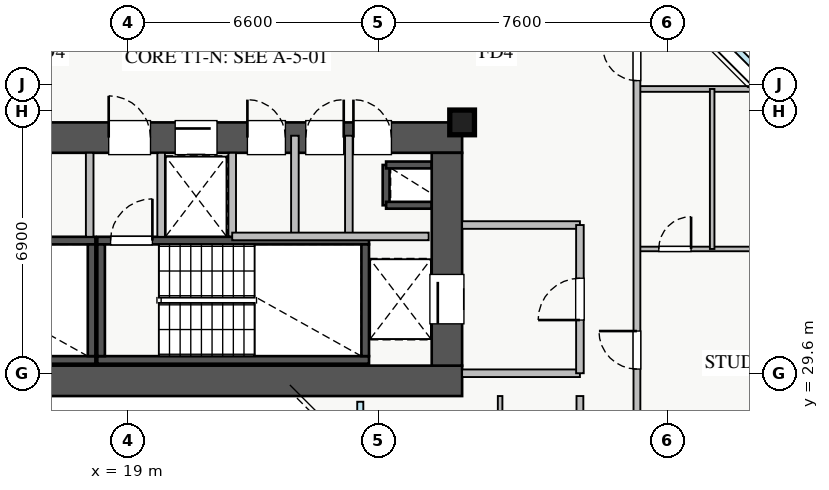
"""IFC4 building model, lengths in metres.
Left out: names, types, materials, properties, quantities, classifications, styles, units other than length and angle.
Written with IfcOpenShell. Run it as: python <this file> out.ifc"""

import sys

from ifc_helpers import new_model, si_unit, direction, frame, frame_2d, origin, origin_2d, place, context, subcontext, project, spatial, rectangle, extrude, source, transform, mapped, element, fill, save


model = new_model("IFC4")
c1 = context("Model", 3, precision=1e-05, world=origin(), true_north=direction((0.0, 1.0)))
c2 = subcontext(c1, "Body", "Model", "MODEL_VIEW")
j1 = project(units=[si_unit("LENGTHUNIT", "METRE"), si_unit("PLANEANGLEUNIT", "RADIAN")], contexts=[c1])
p1 = place(None, origin())
s1 = spatial("IfcSite", under=j1, at=p1, CompositionType="ELEMENT")
p2 = place(p1, origin())
s2 = spatial("IfcBuilding", under=s1, at=p2, CompositionType="ELEMENT")
p3 = place(p2, frame((0.0, 0.0, 53.5)))
s3 = spatial("IfcBuildingStorey", under=s2, at=p3, CompositionType="ELEMENT", Elevation=53.5)
p4 = place(p3, frame((25.8, 34.02, 0.0), z_axis=(0.0, 0.0, 1.0), x_axis=(0.0, 1.0, 0.0)))
e1 = element("IfcWall", 1, at=p4, inside=s3, PredefinedType="SHEAR", context=c2, shape_type="SweptSolid", body=[
    extrude(rectangle(XDim=1.06, YDim=0.18, at=frame_2d((0.53, 0.0))), origin(), (0.0, 0.0, 1.0), 3.07),
])
for number, where, z_axis, x_axis in (
    (2, (25.8, 35.08, 0.0), (0.0, 0.0, 1.0), (1.0, 0.0, 0.0)),
    (3, (25.8, 34.02, 0.0), (0.0, 0.0, 1.0), (1.0, 0.0, 0.0)),
):
    element("IfcWall", number, at=place(p3, frame(where, z_axis=z_axis, x_axis=x_axis)), inside=s3, PredefinedType="SHEAR", context=c2, shape_type="SweptSolid", body=[
        extrude(rectangle(XDim=1.2, YDim=0.18, at=frame_2d((0.6, 0.0))), origin(), (0.0, 0.0, 1.0), 3.07),
    ])
p5 = place(p3, frame((19.88, 33.2, 0.0), z_axis=(0.0, 0.0, 1.0), x_axis=(1.0, 0.0, 0.0)))
e4 = element("IfcWall", 4, at=p5, inside=s3, PredefinedType="SHEAR", context=c2, shape_type="SweptSolid", body=[
    extrude(rectangle(XDim=1.87, YDim=0.18, at=frame_2d((0.935, 0.0))), origin(), (0.0, 0.0, 1.0), 3.07),
])
p6 = place(p3, frame((11.0, 29.95, 0.0), z_axis=(0.0, 0.0, 1.0), x_axis=(1.0, 0.0, 0.0)))
e5 = element("IfcWall", 5, at=p6, inside=s3, PredefinedType="SHEAR", context=c2, shape_type="SweptSolid", body=[
    extrude(rectangle(XDim=7.15, YDim=0.2, at=frame_2d((3.575, 0.0))), origin(), (0.0, 0.0, 1.0), 3.25),
])
p7 = place(p3, frame((11.0, 33.09, 0.0), z_axis=(0.0, 0.0, 1.0), x_axis=(1.0, 0.0, 0.0)))
e6 = element("IfcWall", 6, at=p7, inside=s3, PredefinedType="SHEAR", context=c2, shape_type="SweptSolid", body=[
    extrude(rectangle(XDim=7.15, YDim=0.2, at=frame_2d((3.575, 0.0))), origin(), (0.0, 0.0, 1.0), 3.25),
])
p8 = place(p7, frame((0.35, 0.0, 0.0)))
e7 = element("IfcOpeningElement", 7, at=p8, cuts=e6, PredefinedType="OPENING", context=c2, shape_type="SweptSolid", body=[
    extrude(rectangle(XDim=1.1, YDim=2.05, at=frame_2d((0.55, 1.025))), frame((0.0, 0.11, 0.0), z_axis=(0.0, -1.0, 0.0), x_axis=(1.0, 0.0, 0.0)), (0.0, 0.0, 1.0), 0.22),
])
p9 = place(p3, frame((18.05, 30.05, 0.0), z_axis=(0.0, 0.0, 1.0), x_axis=(0.0, 1.0, 0.0)))
e8 = element("IfcWall", 8, at=p9, inside=s3, PredefinedType="SHEAR", context=c2, shape_type="SweptSolid", body=[
    extrude(rectangle(XDim=2.94, YDim=0.2, at=frame_2d((1.47, 0.0))), origin(), (0.0, 0.0, 1.0), 3.25),
])
p10 = place(p3, frame((18.2, 29.95, 0.0), z_axis=(0.0, 0.0, 1.0), x_axis=(1.0, 0.0, 0.0)))
e9 = element("IfcWall", 9, at=p10, inside=s3, PredefinedType="SHEAR", context=c2, shape_type="SweptSolid", body=[
    extrude(rectangle(XDim=7.15, YDim=0.2, at=frame_2d((3.575, 0.0))), origin(), (0.0, 0.0, 1.0), 3.25),
])
p11 = place(p3, frame((18.2, 33.09, 0.0), z_axis=(0.0, 0.0, 1.0), x_axis=(1.0, 0.0, 0.0)))
e10 = element("IfcWall", 10, at=p11, inside=s3, PredefinedType="SHEAR", context=c2, shape_type="SweptSolid", body=[
    extrude(rectangle(XDim=7.15, YDim=0.2, at=frame_2d((3.575, 0.0))), origin(), (0.0, 0.0, 1.0), 3.25),
])
p12 = place(p11, frame((0.35, 0.0, 0.0)))
e11 = element("IfcOpeningElement", 11, at=p12, cuts=e10, PredefinedType="OPENING", context=c2, shape_type="SweptSolid", body=[
    extrude(rectangle(XDim=1.1, YDim=2.05, at=frame_2d((0.55, 1.025))), frame((0.0, 0.11, 0.0), z_axis=(0.0, -1.0, 0.0), x_axis=(1.0, 0.0, 0.0)), (0.0, 0.0, 1.0), 0.22),
])
for number, where, z_axis, x_axis in (
    (12, (18.3, 30.05, 0.0), (0.0, 0.0, 1.0), (0.0, 1.0, 0.0)),
    (13, (25.25, 30.05, 0.0), (0.0, 0.0, 1.0), (0.0, 1.0, 0.0)),
):
    element("IfcWall", number, at=place(p3, frame(where, z_axis=z_axis, x_axis=x_axis)), inside=s3, PredefinedType="SHEAR", context=c2, shape_type="SweptSolid", body=[
        extrude(rectangle(XDim=2.94, YDim=0.2, at=frame_2d((1.47, 0.0))), origin(), (0.0, 0.0, 1.0), 3.25),
    ])
p13 = place(p3, frame((10.2, 29.4, 0.0), z_axis=(0.0, 0.0, 1.0), x_axis=(1.0, 0.0, 0.0)))
e14 = element("IfcWall", 14, at=p13, inside=s3, PredefinedType="SHEAR", context=c2, shape_type="SweptSolid", body=[
    extrude(rectangle(XDim=17.6, YDim=0.8, at=frame_2d((8.8, 0.0))), origin(), (0.0, 0.0, 1.0), 3.25),
])
p14 = place(p3, frame((10.2, 35.8, 0.0), z_axis=(0.0, 0.0, 1.0), x_axis=(1.0, 0.0, 0.0)))
e15 = element("IfcWall", 15, at=p14, inside=s3, PredefinedType="SHEAR", context=c2, shape_type="SweptSolid", body=[
    extrude(rectangle(XDim=17.6, YDim=0.8, at=frame_2d((8.8, 0.0))), origin(), (0.0, 0.0, 1.0), 3.25),
])
p15 = place(p14, frame((1.15, 0.0, 0.0)))
e16 = element("IfcOpeningElement", 16, at=p15, cuts=e15, PredefinedType="OPENING", context=c2, shape_type="SweptSolid", body=[
    extrude(rectangle(XDim=1.1, YDim=2.05, at=frame_2d((0.55, 1.025))), frame((0.0, 0.41, 0.0), z_axis=(0.0, -1.0, 0.0), x_axis=(1.0, 0.0, 0.0)), (0.0, 0.0, 1.0), 0.82),
])
p16 = place(p14, frame((8.3, 0.0, 0.0)))
e17 = element("IfcOpeningElement", 17, at=p16, cuts=e15, PredefinedType="OPENING", context=c2, shape_type="SweptSolid", body=[
    extrude(rectangle(XDim=1.1, YDim=2.05, at=frame_2d((0.55, 1.025))), frame((0.0, 0.41, 0.0), z_axis=(0.0, -1.0, 0.0), x_axis=(1.0, 0.0, 0.0)), (0.0, 0.0, 1.0), 0.82),
])
p17 = place(p14, frame((10.05, 0.0, 0.0)))
e18 = element("IfcOpeningElement", 18, at=p17, cuts=e15, PredefinedType="OPENING", context=c2, shape_type="SweptSolid", body=[
    extrude(rectangle(XDim=1.1, YDim=2.05, at=frame_2d((0.55, 1.025))), frame((0.0, 0.41, 0.0), z_axis=(0.0, -1.0, 0.0), x_axis=(1.0, 0.0, 0.0)), (0.0, 0.0, 1.0), 0.82),
])
p18 = place(p14, frame((14.74, 0.0, 0.0)))
e19 = element("IfcOpeningElement", 19, at=p18, cuts=e15, PredefinedType="OPENING", context=c2, shape_type="SweptSolid", body=[
    extrude(rectangle(XDim=1.0, YDim=2.05, at=frame_2d((0.5, 1.025))), frame((0.0, 0.41, 0.0), z_axis=(0.0, -1.0, 0.0), x_axis=(1.0, 0.0, 0.0)), (0.0, 0.0, 1.0), 0.82),
])
p19 = place(p14, frame((11.95, 0.0, 0.0)))
e20 = element("IfcOpeningElement", 20, at=p19, cuts=e15, PredefinedType="OPENING", context=c2, shape_type="SweptSolid", body=[
    extrude(rectangle(XDim=1.0, YDim=2.05, at=frame_2d((0.5, 1.025))), frame((0.0, 0.41, 0.0), z_axis=(0.0, -1.0, 0.0), x_axis=(1.0, 0.0, 0.0)), (0.0, 0.0, 1.0), 0.82),
])
p20 = place(p14, frame((13.485, 0.0, 0.0)))
e21 = element("IfcOpeningElement", 21, at=p20, cuts=e15, PredefinedType="OPENING", context=c2, shape_type="SweptSolid", body=[
    extrude(rectangle(XDim=1.0, YDim=2.05, at=frame_2d((0.5, 1.025))), frame((0.0, 0.41, 0.0), z_axis=(0.0, -1.0, 0.0), x_axis=(1.0, 0.0, 0.0)), (0.0, 0.0, 1.0), 0.82),
])
p21 = place(p3, frame((27.4, 29.8, 0.0), z_axis=(0.0, 0.0, 1.0), x_axis=(0.0, 1.0, 0.0)))
e22 = element("IfcWall", 22, at=p21, inside=s3, PredefinedType="SHEAR", context=c2, shape_type="SweptSolid", body=[
    extrude(rectangle(XDim=5.6, YDim=0.8, at=frame_2d((2.8, 0.0))), origin(), (0.0, 0.0, 1.0), 3.25),
])
p22 = place(p21, frame((1.1, 0.0, 0.0)))
e23 = element("IfcOpeningElement", 23, at=p22, cuts=e22, PredefinedType="OPENING", context=c2, shape_type="SweptSolid", body=[
    extrude(rectangle(XDim=1.3, YDim=2.05, at=frame_2d((0.65, 1.025))), frame((0.0, 0.41, 0.0), z_axis=(0.0, -1.0, 0.0), x_axis=(1.0, 0.0, 0.0)), (0.0, 0.0, 1.0), 0.82),
])
m1 = source(origin(), c2, "Body", "SweptSolid", [
    extrude(rectangle(XDim=0.65, YDim=0.65, at=origin_2d()), origin(), (0.0, 0.0, 1.0), 3.25),
])
p23 = place(p3, frame((27.8, 36.2, 0.0), z_axis=(0.0, 0.0, 1.0), x_axis=(1.0, 0.0, 0.0)))
e24 = element("IfcColumn", 24, at=p23, inside=s3, PredefinedType="PILASTER", context=c2, shape_type="MappedRepresentation", body=[
    mapped(m1, transform((0.0, 0.0, 0.0), x_axis=(1.0, 0.0, 0.0), y_axis=(0.0, 1.0, 0.0), z_axis=(0.0, 0.0, 1.0), scale=1.0)),
])
for number, where, z_axis, x_axis in (
    (25, (27.8, 29.6, 0.0), (0.0, 0.0, 1.0), (1.0, 0.0, 0.0)),
    (26, (27.8, 33.5, 0.0), (0.0, 0.0, 1.0), (1.0, 0.0, 0.0)),
):
    element("IfcWall", number, at=place(p3, frame(where, z_axis=z_axis, x_axis=x_axis)), inside=s3, PredefinedType="PARTITIONING", context=c2, shape_type="SweptSolid", body=[
        extrude(rectangle(XDim=3.1, YDim=0.2, at=frame_2d((1.55, 0.0))), origin(), (0.0, 0.0, 1.0), 3.07),
    ])
p24 = place(p3, frame((30.9, 29.6, 0.0), z_axis=(0.0, 0.0, 1.0), x_axis=(0.0, 1.0, 0.0)))
e27 = element("IfcWall", 27, at=p24, inside=s3, PredefinedType="PARTITIONING", context=c2, shape_type="SweptSolid", body=[
    extrude(rectangle(XDim=3.9, YDim=0.2, at=frame_2d((1.95, 0.0))), origin(), (0.0, 0.0, 1.0), 3.07),
])
p25 = place(p24, frame((1.4, 0.0, 0.0)))
e28 = element("IfcOpeningElement", 28, at=p25, cuts=e27, PredefinedType="OPENING", context=c2, shape_type="SweptSolid", body=[
    extrude(rectangle(XDim=1.1, YDim=2.05, at=frame_2d((0.55, 1.025))), frame((0.0, 0.11, 0.0), z_axis=(0.0, -1.0, 0.0), x_axis=(1.0, 0.0, 0.0)), (0.0, 0.0, 1.0), 0.22),
])
for number, where, z_axis, x_axis in (
    (29, (18.0, 33.19, 0.0), (0.0, 0.0, 1.0), (0.0, 1.0, 0.0)),
    (30, (19.88, 33.19, 0.0), (0.0, 0.0, 1.0), (0.0, 1.0, 0.0)),
):
    element("IfcWall", number, at=place(p3, frame(where, z_axis=z_axis, x_axis=x_axis)), inside=s3, PredefinedType="PARTITIONING", context=c2, shape_type="SweptSolid", body=[
        extrude(rectangle(XDim=2.21, YDim=0.2, at=frame_2d((1.105, 0.0))), origin(), (0.0, 0.0, 1.0), 3.07),
    ])
p26 = place(p3, frame((24.82, 33.2, 0.0), z_axis=(0.0, 0.0, 1.0), x_axis=(0.0, 1.0, 0.0)))
e31 = element("IfcWall", 31, at=p26, inside=s3, PredefinedType="PARTITIONING", context=c2, shape_type="SweptSolid", body=[
    extrude(rectangle(XDim=2.65, YDim=0.2, at=frame_2d((1.325, 0.0))), origin(), (0.0, 0.0, 1.0), 3.07),
])
p27 = place(p3, frame((21.75, 33.2, 0.0), z_axis=(0.0, 0.0, 1.0), x_axis=(0.0, 1.0, 0.0)))
e32 = element("IfcWall", 32, at=p27, inside=s3, PredefinedType="PARTITIONING", context=c2, shape_type="SweptSolid", body=[
    extrude(rectangle(XDim=2.2, YDim=0.2, at=frame_2d((1.1, 0.0))), origin(), (0.0, 0.0, 1.0), 3.07),
])
p28 = place(p3, frame((23.4, 33.2, 0.0), z_axis=(0.0, 0.0, 1.0), x_axis=(0.0, 1.0, 0.0)))
e33 = element("IfcWall", 33, at=p28, inside=s3, PredefinedType="PARTITIONING", context=c2, shape_type="SweptSolid", body=[
    extrude(rectangle(XDim=2.65, YDim=0.2, at=frame_2d((1.325, 0.0))), origin(), (0.0, 0.0, 1.0), 3.07),
])
p29 = place(p3, frame((21.75, 33.2, 0.0), z_axis=(0.0, 0.0, 1.0), x_axis=(1.0, 0.0, 0.0)))
e34 = element("IfcWall", 34, at=p29, inside=s3, PredefinedType="PARTITIONING", context=c2, shape_type="SweptSolid", body=[
    extrude(rectangle(XDim=5.17, YDim=0.2, at=frame_2d((2.585, 0.0))), origin(), (0.0, 0.0, 1.0), 3.07),
])
p30 = place(p3, frame((32.4, 37.08, 0.0), z_axis=(0.0, 0.0, 1.0), x_axis=(1.0, 0.0, 0.0)))
e35 = element("IfcWall", 35, at=p30, inside=s3, PredefinedType="PARTITIONING", context=c2, shape_type="SweptSolid", body=[
    extrude(rectangle(XDim=5.35, YDim=0.15, at=frame_2d((2.675, 0.0))), origin(), (0.0, 0.0, 1.0), 3.07),
])
p31 = place(p3, frame((32.4, 32.87, 0.0), z_axis=(0.0, 0.0, 1.0), x_axis=(1.0, 0.0, 0.0)))
e36 = element("IfcWall", 36, at=p31, inside=s3, PredefinedType="PLUMBINGWALL", context=c2, shape_type="SweptSolid", body=[
    extrude(rectangle(XDim=5.35, YDim=0.12, at=frame_2d((2.675, 0.0))), origin(), (0.0, 0.0, 1.0), 3.07),
])
p32 = place(p31, frame((0.575, 0.0, 0.0)))
e37 = element("IfcOpeningElement", 37, at=p32, cuts=e36, PredefinedType="OPENING", context=c2, shape_type="SweptSolid", body=[
    extrude(rectangle(XDim=0.85, YDim=2.05, at=frame_2d((0.425, 1.025))), frame((0.0, 0.07, 0.0), z_axis=(0.0, -1.0, 0.0), x_axis=(1.0, 0.0, 0.0)), (0.0, 0.0, 1.0), 0.14),
])
p33 = place(p31, frame((3.205, 0.0, 0.0)))
e38 = element("IfcOpeningElement", 38, at=p33, cuts=e36, PredefinedType="OPENING", context=c2, shape_type="SweptSolid", body=[
    extrude(rectangle(XDim=0.9, YDim=2.05, at=frame_2d((0.45, 1.025))), frame((0.0, 0.07, 0.0), z_axis=(0.0, -1.0, 0.0), x_axis=(1.0, 0.0, 0.0)), (0.0, 0.0, 1.0), 0.14),
])
p34 = place(p3, frame((34.38, 32.87, 0.0), z_axis=(0.0, 0.0, 1.0), x_axis=(0.0, 1.0, 0.0)))
e39 = element("IfcWall", 39, at=p34, inside=s3, PredefinedType="PLUMBINGWALL", context=c2, shape_type="SweptSolid", body=[
    extrude(rectangle(XDim=4.21, YDim=0.12, at=frame_2d((2.105, 0.0))), origin(), (0.0, 0.0, 1.0), 3.07),
])
p35 = place(p3, frame((32.4, 7.21, 0.0), z_axis=(0.0, 0.0, 1.0), x_axis=(0.0, 1.0, 0.0)))
e40 = element("IfcWall", 40, at=p35, inside=s3, PredefinedType="PARTITIONING", context=c2, shape_type="SweptSolid", body=[
    extrude(rectangle(XDim=31.23, YDim=0.18, at=frame_2d((15.615, 0.0))), origin(), (0.0, 0.0, 1.0), 2.771),
])
p36 = place(p35, frame((30.09, 0.0, 0.0)))
e41 = element("IfcOpeningElement", 41, at=p36, cuts=e40, PredefinedType="OPENING", context=c2, shape_type="SweptSolid", body=[
    extrude(rectangle(XDim=0.9, YDim=2.05, at=frame_2d((0.45, 1.025))), frame((0.0, 0.1, 0.0), z_axis=(0.0, -1.0, 0.0), x_axis=(1.0, 0.0, 0.0)), (0.0, 0.0, 1.0), 0.2),
])
p37 = place(p35, frame((0.415, 0.0, 0.0)))
e42 = element("IfcOpeningElement", 42, at=p37, cuts=e40, PredefinedType="OPENING", context=c2, shape_type="SweptSolid", body=[
    extrude(rectangle(XDim=0.9, YDim=2.05, at=frame_2d((0.45, 1.025))), frame((0.0, 0.1, 0.0), z_axis=(0.0, -1.0, 0.0), x_axis=(1.0, 0.0, 0.0)), (0.0, 0.0, 1.0), 0.2),
])
p38 = place(p35, frame((3.585, 0.0, 0.0)))
e43 = element("IfcOpeningElement", 43, at=p38, cuts=e40, PredefinedType="OPENING", context=c2, shape_type="SweptSolid", body=[
    extrude(rectangle(XDim=1.0, YDim=2.05, at=frame_2d((0.5, 1.025))), frame((0.0, 0.1, 0.0), z_axis=(0.0, -1.0, 0.0), x_axis=(1.0, 0.0, 0.0)), (0.0, 0.0, 1.0), 0.2),
])
p39 = place(p35, frame((12.86, 0.0, 0.0)))
e44 = element("IfcOpeningElement", 44, at=p39, cuts=e40, PredefinedType="OPENING", context=c2, shape_type="SweptSolid", body=[
    extrude(rectangle(XDim=1.0, YDim=2.05, at=frame_2d((0.5, 1.025))), frame((0.0, 0.1, 0.0), z_axis=(0.0, -1.0, 0.0), x_axis=(1.0, 0.0, 0.0)), (0.0, 0.0, 1.0), 0.2),
])
p40 = place(p35, frame((22.5, 0.0, 0.0)))
e45 = element("IfcOpeningElement", 45, at=p40, cuts=e40, PredefinedType="OPENING", context=c2, shape_type="SweptSolid", body=[
    extrude(rectangle(XDim=1.0, YDim=2.05, at=frame_2d((0.5, 1.025))), frame((0.0, 0.1, 0.0), z_axis=(0.0, -1.0, 0.0), x_axis=(1.0, 0.0, 0.0)), (0.0, 0.0, 1.0), 0.2),
])
p41 = place(p3, frame((28.8, 26.24, 0.0), z_axis=(0.0, 0.0, 1.0), x_axis=(0.0, 1.0, 0.0)))
e46 = element("IfcWall", 46, at=p41, inside=s3, PredefinedType="PLUMBINGWALL", context=c2, shape_type="SweptSolid", body=[
    extrude(rectangle(XDim=2.76, YDim=0.12, at=frame_2d((1.38, 0.0))), origin(), (0.0, 0.0, 1.0), 3.07),
])
p42 = place(p3, frame((30.9, 17.0, 0.0), z_axis=(0.0, 0.0, 1.0), x_axis=(0.0, 1.0, 0.0)))
e47 = element("IfcWall", 47, at=p42, inside=s3, PredefinedType="PARTITIONING", context=c2, shape_type="SweptSolid", body=[
    extrude(rectangle(XDim=12.0, YDim=0.18, at=frame_2d((6.0, 0.0))), origin(), (0.0, 0.0, 1.0), 3.07),
])
p43 = place(p42, frame((0.93, 0.0, 0.0)))
e48 = element("IfcOpeningElement", 48, at=p43, cuts=e47, PredefinedType="OPENING", context=c2, shape_type="SweptSolid", body=[
    extrude(rectangle(XDim=1.0, YDim=2.05, at=frame_2d((0.5, 1.025))), frame((0.0, 0.1, 0.0), z_axis=(0.0, -1.0, 0.0), x_axis=(1.0, 0.0, 0.0)), (0.0, 0.0, 1.0), 0.2),
])
p44 = place(p42, frame((6.93, 0.0, 0.0)))
e49 = element("IfcOpeningElement", 49, at=p44, cuts=e47, PredefinedType="OPENING", context=c2, shape_type="SweptSolid", body=[
    extrude(rectangle(XDim=1.0, YDim=2.05, at=frame_2d((0.5, 1.025))), frame((0.0, 0.1, 0.0), z_axis=(0.0, -1.0, 0.0), x_axis=(1.0, 0.0, 0.0)), (0.0, 0.0, 1.0), 0.2),
])
m2 = source(origin(), c2, "Body", "SweptSolid", [
    extrude(rectangle(XDim=1.3, YDim=2.05, at=frame_2d((0.65, 1.025))), frame((0.0, 0.025, 0.0), z_axis=(0.0, -1.0, 0.0), x_axis=(1.0, 0.0, 0.0)), (0.0, 0.0, 1.0), 0.05),
])
p45 = place(p22, origin())
e50 = element("IfcDoor", 50, at=p45, inside=s3, OperationType="SLIDING_TO_LEFT", PredefinedType="DOOR", context=c2, shape_type="MappedRepresentation", body=[
    mapped(m2, transform((0.0, 0.0, 0.0), x_axis=(1.0, 0.0, 0.0), y_axis=(0.0, 1.0, 0.0), z_axis=(0.0, 0.0, 1.0), scale=1.0)),
])
fill(e23, e50)
m3 = source(origin(), c2, "Body", "SweptSolid", [
    extrude(rectangle(XDim=1.1, YDim=2.05, at=frame_2d((0.55, 1.025))), frame((0.0, 0.025, 0.0), z_axis=(0.0, -1.0, 0.0), x_axis=(1.0, 0.0, 0.0)), (0.0, 0.0, 1.0), 0.05),
])
p46 = place(p16, origin())
e51 = element("IfcDoor", 51, at=p46, inside=s3, OperationType="SINGLE_SWING_LEFT", PredefinedType="DOOR", context=c2, shape_type="MappedRepresentation", body=[
    mapped(m3, transform((0.0, 0.0, 0.0), x_axis=(1.0, 0.0, 0.0), y_axis=(0.0, 1.0, 0.0), z_axis=(0.0, 0.0, 1.0), scale=1.0)),
])
fill(e17, e51)
p47 = place(p12, origin())
e52 = element("IfcDoor", 52, at=p47, inside=s3, OperationType="SINGLE_SWING_RIGHT", PredefinedType="DOOR", context=c2, shape_type="MappedRepresentation", body=[
    mapped(m3, transform((0.0, 0.0, 0.0), x_axis=(1.0, 0.0, 0.0), y_axis=(0.0, 1.0, 0.0), z_axis=(0.0, 0.0, 1.0), scale=1.0)),
])
fill(e11, e52)
p48 = place(p17, origin())
e53 = element("IfcDoor", 53, at=p48, inside=s3, OperationType="SLIDING_TO_LEFT", PredefinedType="DOOR", context=c2, shape_type="MappedRepresentation", body=[
    mapped(m3, transform((0.0, 0.0, 0.0), x_axis=(1.0, 0.0, 0.0), y_axis=(0.0, 1.0, 0.0), z_axis=(0.0, 0.0, 1.0), scale=1.0)),
])
fill(e18, e53)
m4 = source(origin(), c2, "Body", "SweptSolid", [
    extrude(rectangle(XDim=1.0, YDim=2.05, at=frame_2d((0.5, 1.025))), frame((0.0, 0.025, 0.0), z_axis=(0.0, -1.0, 0.0), x_axis=(1.0, 0.0, 0.0)), (0.0, 0.0, 1.0), 0.05),
])
p49 = place(p18, origin())
e54 = element("IfcDoor", 54, at=p49, inside=s3, OperationType="SINGLE_SWING_LEFT", PredefinedType="DOOR", context=c2, shape_type="MappedRepresentation", body=[
    mapped(m4, transform((0.0, 0.0, 0.0), x_axis=(1.0, 0.0, 0.0), y_axis=(0.0, 1.0, 0.0), z_axis=(0.0, 0.0, 1.0), scale=1.0)),
])
fill(e19, e54)
p50 = place(p19, origin())
e55 = element("IfcDoor", 55, at=p50, inside=s3, OperationType="SINGLE_SWING_LEFT", PredefinedType="DOOR", context=c2, shape_type="MappedRepresentation", body=[
    mapped(m4, transform((0.0, 0.0, 0.0), x_axis=(1.0, 0.0, 0.0), y_axis=(0.0, 1.0, 0.0), z_axis=(0.0, 0.0, 1.0), scale=1.0)),
])
fill(e20, e55)
p51 = place(p20, origin())
e56 = element("IfcDoor", 56, at=p51, inside=s3, OperationType="SINGLE_SWING_RIGHT", PredefinedType="DOOR", context=c2, shape_type="MappedRepresentation", body=[
    mapped(m4, transform((0.0, 0.0, 0.0), x_axis=(1.0, 0.0, 0.0), y_axis=(0.0, 1.0, 0.0), z_axis=(0.0, 0.0, 1.0), scale=1.0)),
])
fill(e21, e56)
p52 = place(p25, origin())
e57 = element("IfcDoor", 57, at=p52, inside=s3, OperationType="SINGLE_SWING_LEFT", PredefinedType="DOOR", context=c2, shape_type="MappedRepresentation", body=[
    mapped(m3, transform((0.0, 0.0, 0.0), x_axis=(1.0, 0.0, 0.0), y_axis=(0.0, 1.0, 0.0), z_axis=(0.0, 0.0, 1.0), scale=1.0)),
])
fill(e28, e57)
m5 = source(origin(), c2, "Body", "SweptSolid", [
    extrude(rectangle(XDim=0.85, YDim=2.05, at=frame_2d((0.425, 1.025))), frame((0.0, 0.025, 0.0), z_axis=(0.0, -1.0, 0.0), x_axis=(1.0, 0.0, 0.0)), (0.0, 0.0, 1.0), 0.05),
])
p53 = place(p32, origin())
e58 = element("IfcDoor", 58, at=p53, inside=s3, OperationType="SINGLE_SWING_RIGHT", PredefinedType="DOOR", context=c2, shape_type="MappedRepresentation", body=[
    mapped(m5, transform((0.0, 0.0, 0.0), x_axis=(1.0, 0.0, 0.0), y_axis=(0.0, 1.0, 0.0), z_axis=(0.0, 0.0, 1.0), scale=1.0)),
])
fill(e37, e58)
m6 = source(origin(), c2, "Body", "SweptSolid", [
    extrude(rectangle(XDim=0.9, YDim=2.05, at=frame_2d((0.45, 1.025))), frame((0.0, 0.025, 0.0), z_axis=(0.0, -1.0, 0.0), x_axis=(1.0, 0.0, 0.0)), (0.0, 0.0, 1.0), 0.05),
])
p54 = place(p36, origin())
e59 = element("IfcDoor", 59, at=p54, inside=s3, OperationType="SINGLE_SWING_RIGHT", PredefinedType="DOOR", context=c2, shape_type="MappedRepresentation", body=[
    mapped(m6, transform((0.0, 0.0, 0.0), x_axis=(1.0, 0.0, 0.0), y_axis=(0.0, 1.0, 0.0), z_axis=(0.0, 0.0, 1.0), scale=1.0)),
])
fill(e41, e59)
p55 = place(p40, origin())
e60 = element("IfcDoor", 60, at=p55, inside=s3, OperationType="SINGLE_SWING_RIGHT", PredefinedType="DOOR", context=c2, shape_type="MappedRepresentation", body=[
    mapped(m4, transform((0.0, 0.0, 0.0), x_axis=(1.0, 0.0, 0.0), y_axis=(0.0, 1.0, 0.0), z_axis=(0.0, 0.0, 1.0), scale=1.0)),
])
fill(e45, e60)
save(model, sys.argv[1])
